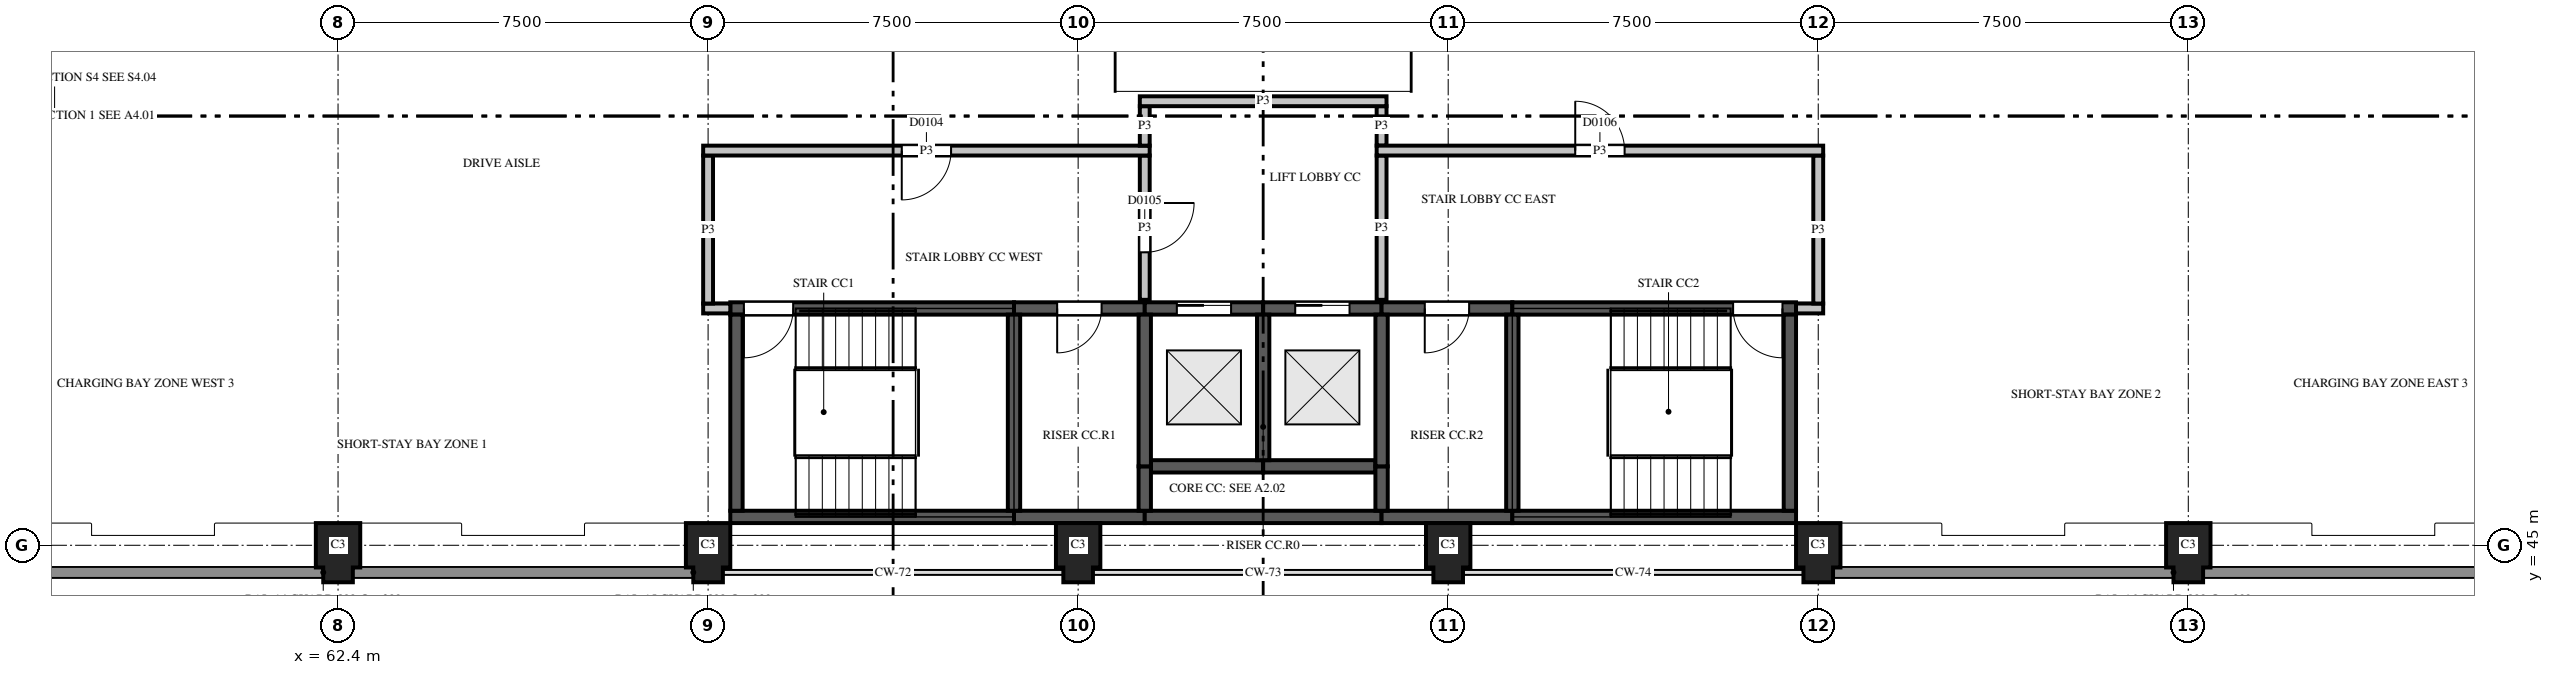
"""IFC4 building model, lengths in metres.
Left out: names, types, materials, properties, quantities, classifications, styles, units other than length and angle.
Written with IfcOpenShell. Run it as: python <this file> out.ifc"""

import sys

from ifc_helpers import new_model, si_unit, direction, frame, frame_2d, origin, place, context, subcontext, project, spatial, polyline, rectangle, outline, extrude, element, fill, save


model = new_model("IFC4")
c1 = context("Model", 3, precision=1e-05, world=origin(), true_north=direction((0.0, 1.0)))
c2 = subcontext(c1, "Body", "Model", "MODEL_VIEW")
j1 = project(units=[si_unit("LENGTHUNIT", "METRE"), si_unit("PLANEANGLEUNIT", "RADIAN")], contexts=[c1])
p1 = place(None, origin())
s1 = spatial("IfcSite", under=j1, at=p1, CompositionType="ELEMENT")
p2 = place(p1, origin())
s2 = spatial("IfcBuilding", under=s1, at=p2, CompositionType="ELEMENT")
p3 = place(p2, frame((0.0, 0.0, 4.5)))
s3 = spatial("IfcBuildingStorey", under=s2, at=p3, CompositionType="ELEMENT", Elevation=4.5)
for number, where, z_axis, x_axis in (
    (1, (62.4, 45.0, 0.0), (0.0, 0.0, 1.0), (0.0, -1.0, 0.0)),
    (2, (69.9, 45.0, 0.0), (0.0, 0.0, 1.0), (0.0, -1.0, 0.0)),
    (3, (77.4, 45.0, 0.0), (0.0, 0.0, 1.0), (0.0, -1.0, 0.0)),
    (4, (84.9, 45.0, 0.0), (0.0, 0.0, 1.0), (0.0, -1.0, 0.0)),
    (5, (92.4, 45.0, 0.0), (0.0, 0.0, 1.0), (0.0, -1.0, 0.0)),
    (6, (99.9, 45.0, 0.0), (0.0, 0.0, 1.0), (0.0, -1.0, 0.0)),
):
    element("IfcColumn", number, at=place(p3, frame(where, z_axis=z_axis, x_axis=x_axis)), inside=s3, PredefinedType="COLUMN", context=c2, shape_type="SweptSolid", body=[
        extrude(outline(polyline([(-0.45, -0.45), (0.45, -0.45), (0.45, -0.3), (0.75, -0.3), (0.75, 0.3), (0.45, 0.3), (0.45, 0.45), (-0.45, 0.45), (-0.45, -0.45)])), origin(), (0.0, 0.0, 1.0), 3.7),
    ])
p4 = place(p3, frame((70.35, 45.575, 0.0), z_axis=(0.0, 0.0, 1.0), x_axis=(1.0, 0.0, 0.0)))
e7 = element("IfcWall", 7, at=p4, inside=s3, PredefinedType="SHEAR", context=c2, shape_type="SweptSolid", body=[
    extrude(rectangle(XDim=5.75, YDim=0.25, at=frame_2d((2.875, 0.0))), origin(), (0.0, 0.0, 1.0), 3.7),
])
p5 = place(p3, frame((76.1, 45.575, 0.0), z_axis=(0.0, 0.0, 1.0), x_axis=(1.0, 0.0, 0.0)))
e8 = element("IfcWall", 8, at=p5, inside=s3, PredefinedType="SHEAR", context=c2, shape_type="SweptSolid", body=[
    extrude(rectangle(XDim=2.65, YDim=0.25, at=frame_2d((1.325, 0.0))), origin(), (0.0, 0.0, 1.0), 3.7),
])
p6 = place(p3, frame((78.75, 45.575, 0.0), z_axis=(0.0, 0.0, 1.0), x_axis=(1.0, 0.0, 0.0)))
e9 = element("IfcWall", 9, at=p6, inside=s3, PredefinedType="SHEAR", context=c2, shape_type="SweptSolid", body=[
    extrude(rectangle(XDim=4.8, YDim=0.25, at=frame_2d((2.4, 0.0))), origin(), (0.0, 0.0, 1.0), 3.7),
])
p7 = place(p3, frame((83.55, 45.575, 0.0), z_axis=(0.0, 0.0, 1.0), x_axis=(1.0, 0.0, 0.0)))
e10 = element("IfcWall", 10, at=p7, inside=s3, PredefinedType="SHEAR", context=c2, shape_type="SweptSolid", body=[
    extrude(rectangle(XDim=2.65, YDim=0.25, at=frame_2d((1.325, 0.0))), origin(), (0.0, 0.0, 1.0), 3.7),
])
p8 = place(p3, frame((86.2, 45.575, 0.0), z_axis=(0.0, 0.0, 1.0), x_axis=(1.0, 0.0, 0.0)))
e11 = element("IfcWall", 11, at=p8, inside=s3, PredefinedType="SHEAR", context=c2, shape_type="SweptSolid", body=[
    extrude(rectangle(XDim=5.75, YDim=0.25, at=frame_2d((2.875, 0.0))), origin(), (0.0, 0.0, 1.0), 3.7),
])
p9 = place(p3, frame((78.875, 46.6, 0.0), z_axis=(0.0, 0.0, 1.0), x_axis=(1.0, 0.0, 0.0)))
e12 = element("IfcWall", 12, at=p9, inside=s3, PredefinedType="SHEAR", context=c2, shape_type="SweptSolid", body=[
    extrude(rectangle(XDim=2.275, YDim=0.25, at=frame_2d((1.137, 0.0))), origin(), (0.0, 0.0, 1.0), 3.7),
])
p10 = place(p3, frame((81.15, 46.6, 0.0), z_axis=(0.0, 0.0, 1.0), x_axis=(1.0, 0.0, 0.0)))
e13 = element("IfcWall", 13, at=p10, inside=s3, PredefinedType="SHEAR", context=c2, shape_type="SweptSolid", body=[
    extrude(rectangle(XDim=2.275, YDim=0.25, at=frame_2d((1.138, 0.0))), origin(), (0.0, 0.0, 1.0), 3.7),
])
p11 = place(p3, frame((70.35, 49.8, 0.0), z_axis=(0.0, 0.0, 1.0), x_axis=(1.0, 0.0, 0.0)))
e14 = element("IfcWall", 14, at=p11, inside=s3, PredefinedType="SHEAR", context=c2, shape_type="SweptSolid", body=[
    extrude(rectangle(XDim=5.75, YDim=0.25, at=frame_2d((2.875, 0.0))), origin(), (0.0, 0.0, 1.0), 3.7),
])
p12 = place(p11, frame((0.275, 0.0, 0.0)))
e15 = element("IfcOpeningElement", 15, at=p12, cuts=e14, PredefinedType="OPENING", context=c2, shape_type="SweptSolid", body=[
    extrude(rectangle(XDim=1.0, YDim=2.1, at=frame_2d((0.5, 1.05))), frame((0.0, 0.135, 0.0), z_axis=(0.0, -1.0, 0.0), x_axis=(1.0, 0.0, 0.0)), (0.0, 0.0, 1.0), 0.27),
])
p13 = place(p3, frame((76.1, 49.8, 0.0), z_axis=(0.0, 0.0, 1.0), x_axis=(1.0, 0.0, 0.0)))
e16 = element("IfcWall", 16, at=p13, inside=s3, PredefinedType="SHEAR", context=c2, shape_type="SweptSolid", body=[
    extrude(rectangle(XDim=2.65, YDim=0.25, at=frame_2d((1.325, 0.0))), origin(), (0.0, 0.0, 1.0), 3.7),
])
p14 = place(p13, frame((0.875, 0.0, 0.0)))
e17 = element("IfcOpeningElement", 17, at=p14, cuts=e16, PredefinedType="OPENING", context=c2, shape_type="SweptSolid", body=[
    extrude(rectangle(XDim=0.9, YDim=2.1, at=frame_2d((0.45, 1.05))), frame((0.0, 0.135, 0.0), z_axis=(0.0, -1.0, 0.0), x_axis=(1.0, 0.0, 0.0)), (0.0, 0.0, 1.0), 0.27),
])
p15 = place(p3, frame((78.75, 49.8, 0.0), z_axis=(0.0, 0.0, 1.0), x_axis=(1.0, 0.0, 0.0)))
e18 = element("IfcWall", 18, at=p15, inside=s3, PredefinedType="SHEAR", context=c2, shape_type="SweptSolid", body=[
    extrude(rectangle(XDim=2.4, YDim=0.25, at=frame_2d((1.2, 0.0))), origin(), (0.0, 0.0, 1.0), 3.7),
])
p16 = place(p15, frame((0.65, 0.0, 0.0)))
e19 = element("IfcOpeningElement", 19, at=p16, cuts=e18, PredefinedType="OPENING", context=c2, shape_type="SweptSolid", body=[
    extrude(rectangle(XDim=1.1, YDim=2.1, at=frame_2d((0.55, 1.05))), frame((0.0, 0.135, 0.0), z_axis=(0.0, -1.0, 0.0), x_axis=(1.0, 0.0, 0.0)), (0.0, 0.0, 1.0), 0.27),
])
p17 = place(p3, frame((81.15, 49.8, 0.0), z_axis=(0.0, 0.0, 1.0), x_axis=(1.0, 0.0, 0.0)))
e20 = element("IfcWall", 20, at=p17, inside=s3, PredefinedType="SHEAR", context=c2, shape_type="SweptSolid", body=[
    extrude(rectangle(XDim=2.4, YDim=0.25, at=frame_2d((1.2, 0.0))), origin(), (0.0, 0.0, 1.0), 3.7),
])
p18 = place(p17, frame((0.65, 0.0, 0.0)))
e21 = element("IfcOpeningElement", 21, at=p18, cuts=e20, PredefinedType="OPENING", context=c2, shape_type="SweptSolid", body=[
    extrude(rectangle(XDim=1.1, YDim=2.1, at=frame_2d((0.55, 1.05))), frame((0.0, 0.135, 0.0), z_axis=(0.0, -1.0, 0.0), x_axis=(1.0, 0.0, 0.0)), (0.0, 0.0, 1.0), 0.27),
])
p19 = place(p3, frame((83.55, 49.8, 0.0), z_axis=(0.0, 0.0, 1.0), x_axis=(1.0, 0.0, 0.0)))
e22 = element("IfcWall", 22, at=p19, inside=s3, PredefinedType="SHEAR", context=c2, shape_type="SweptSolid", body=[
    extrude(rectangle(XDim=2.65, YDim=0.25, at=frame_2d((1.325, 0.0))), origin(), (0.0, 0.0, 1.0), 3.7),
])
p20 = place(p19, frame((0.875, 0.0, 0.0)))
e23 = element("IfcOpeningElement", 23, at=p20, cuts=e22, PredefinedType="OPENING", context=c2, shape_type="SweptSolid", body=[
    extrude(rectangle(XDim=0.9, YDim=2.1, at=frame_2d((0.45, 1.05))), frame((0.0, 0.135, 0.0), z_axis=(0.0, -1.0, 0.0), x_axis=(1.0, 0.0, 0.0)), (0.0, 0.0, 1.0), 0.27),
])
p21 = place(p3, frame((86.2, 49.8, 0.0), z_axis=(0.0, 0.0, 1.0), x_axis=(1.0, 0.0, 0.0)))
e24 = element("IfcWall", 24, at=p21, inside=s3, PredefinedType="SHEAR", context=c2, shape_type="SweptSolid", body=[
    extrude(rectangle(XDim=5.75, YDim=0.25, at=frame_2d((2.875, 0.0))), origin(), (0.0, 0.0, 1.0), 3.7),
])
p22 = place(p21, frame((4.475, 0.0, 0.0)))
e25 = element("IfcOpeningElement", 25, at=p22, cuts=e24, PredefinedType="OPENING", context=c2, shape_type="SweptSolid", body=[
    extrude(rectangle(XDim=1.0, YDim=2.1, at=frame_2d((0.5, 1.05))), frame((0.0, 0.135, 0.0), z_axis=(0.0, -1.0, 0.0), x_axis=(1.0, 0.0, 0.0)), (0.0, 0.0, 1.0), 0.27),
])
for number, where, z_axis, x_axis in (
    (26, (70.475, 45.7, 0.0), (0.0, 0.0, 1.0), (0.0, 1.0, 0.0)),
    (27, (76.1, 45.7, 0.0), (0.0, 0.0, 1.0), (0.0, 1.0, 0.0)),
):
    element("IfcWall", number, at=place(p3, frame(where, z_axis=z_axis, x_axis=x_axis)), inside=s3, PredefinedType="SHEAR", context=c2, shape_type="SweptSolid", body=[
        extrude(rectangle(XDim=3.975, YDim=0.25, at=frame_2d((1.988, 0.0))), origin(), (0.0, 0.0, 1.0), 3.7),
    ])
p23 = place(p3, frame((78.75, 45.7, 0.0), z_axis=(0.0, 0.0, 1.0), x_axis=(0.0, 1.0, 0.0)))
e28 = element("IfcWall", 28, at=p23, inside=s3, PredefinedType="SHEAR", context=c2, shape_type="SweptSolid", body=[
    extrude(rectangle(XDim=0.9, YDim=0.25, at=frame_2d((0.45, 0.0))), origin(), (0.0, 0.0, 1.0), 3.7),
])
p24 = place(p3, frame((78.75, 46.6, 0.0), z_axis=(0.0, 0.0, 1.0), x_axis=(0.0, 1.0, 0.0)))
e29 = element("IfcWall", 29, at=p24, inside=s3, PredefinedType="SHEAR", context=c2, shape_type="SweptSolid", body=[
    extrude(rectangle(XDim=3.075, YDim=0.25, at=frame_2d((1.538, 0.0))), origin(), (0.0, 0.0, 1.0), 3.7),
])
p25 = place(p3, frame((81.15, 46.725, 0.0), z_axis=(0.0, 0.0, 1.0), x_axis=(0.0, 1.0, 0.0)))
e30 = element("IfcWall", 30, at=p25, inside=s3, PredefinedType="SHEAR", context=c2, shape_type="SweptSolid", body=[
    extrude(rectangle(XDim=2.95, YDim=0.25, at=frame_2d((1.475, 0.0))), origin(), (0.0, 0.0, 1.0), 3.7),
])
p26 = place(p3, frame((83.55, 45.7, 0.0), z_axis=(0.0, 0.0, 1.0), x_axis=(0.0, 1.0, 0.0)))
e31 = element("IfcWall", 31, at=p26, inside=s3, PredefinedType="SHEAR", context=c2, shape_type="SweptSolid", body=[
    extrude(rectangle(XDim=0.9, YDim=0.25, at=frame_2d((0.45, 0.0))), origin(), (0.0, 0.0, 1.0), 3.7),
])
p27 = place(p3, frame((83.55, 46.6, 0.0), z_axis=(0.0, 0.0, 1.0), x_axis=(0.0, 1.0, 0.0)))
e32 = element("IfcWall", 32, at=p27, inside=s3, PredefinedType="SHEAR", context=c2, shape_type="SweptSolid", body=[
    extrude(rectangle(XDim=3.075, YDim=0.25, at=frame_2d((1.538, 0.0))), origin(), (0.0, 0.0, 1.0), 3.7),
])
for number, where, z_axis, x_axis in (
    (33, (86.2, 45.7, 0.0), (0.0, 0.0, 1.0), (0.0, 1.0, 0.0)),
    (34, (91.825, 45.7, 0.0), (0.0, 0.0, 1.0), (0.0, 1.0, 0.0)),
):
    element("IfcWall", number, at=place(p3, frame(where, z_axis=z_axis, x_axis=x_axis)), inside=s3, PredefinedType="SHEAR", context=c2, shape_type="SweptSolid", body=[
        extrude(rectangle(XDim=3.975, YDim=0.25, at=frame_2d((1.988, 0.0))), origin(), (0.0, 0.0, 1.0), 3.7),
    ])
for number, where, z_axis, x_axis in (
    (35, (69.8, 49.8, 0.0), (0.0, 0.0, 1.0), (1.0, 0.0, 0.0)),
    (36, (91.95, 49.8, 0.0), (0.0, 0.0, 1.0), (1.0, 0.0, 0.0)),
):
    element("IfcWall", number, at=place(p3, frame(where, z_axis=z_axis, x_axis=x_axis)), inside=s3, PredefinedType="PARTITIONING", context=c2, shape_type="SweptSolid", body=[
        extrude(rectangle(XDim=0.55, YDim=0.2, at=frame_2d((0.275, 0.0))), origin(), (0.0, 0.0, 1.0), 2.88),
    ])
p28 = place(p3, frame((92.4, 49.9, 0.0), z_axis=(0.0, 0.0, 1.0), x_axis=(0.0, 1.0, 0.0)))
e37 = element("IfcWall", 37, at=p28, inside=s3, PredefinedType="PARTITIONING", context=c2, shape_type="SweptSolid", body=[
    extrude(rectangle(XDim=3.0, YDim=0.2, at=frame_2d((1.5, 0.0))), origin(), (0.0, 0.0, 1.0), 2.88),
])
p29 = place(p3, frame((78.75, 49.975, 0.0), z_axis=(0.0, 0.0, 1.0), x_axis=(0.0, 1.0, 0.0)))
e38 = element("IfcWall", 38, at=p29, inside=s3, PredefinedType="PARTITIONING", context=c2, shape_type="SweptSolid", body=[
    extrude(rectangle(XDim=2.925, YDim=0.2, at=frame_2d((1.462, 0.0))), origin(), (0.0, 0.0, 1.0), 2.88),
])
p30 = place(p29, frame((0.962, 0.0, 0.0)))
e39 = element("IfcOpeningElement", 39, at=p30, cuts=e38, PredefinedType="OPENING", context=c2, shape_type="SweptSolid", body=[
    extrude(rectangle(XDim=1.0, YDim=2.1, at=frame_2d((0.5, 1.05))), frame((0.0, 0.11, 0.0), z_axis=(0.0, -1.0, 0.0), x_axis=(1.0, 0.0, 0.0)), (0.0, 0.0, 1.0), 0.22),
])
p31 = place(p3, frame((83.55, 49.975, 0.0), z_axis=(0.0, 0.0, 1.0), x_axis=(0.0, 1.0, 0.0)))
e40 = element("IfcWall", 40, at=p31, inside=s3, PredefinedType="PARTITIONING", context=c2, shape_type="SweptSolid", body=[
    extrude(rectangle(XDim=2.925, YDim=0.2, at=frame_2d((1.462, 0.0))), origin(), (0.0, 0.0, 1.0), 2.88),
])
p32 = place(p3, frame((69.9, 52.9, 0.0), z_axis=(0.0, 0.0, 1.0), x_axis=(0.0, -1.0, 0.0)))
e41 = element("IfcWall", 41, at=p32, inside=s3, PredefinedType="PARTITIONING", context=c2, shape_type="SweptSolid", body=[
    extrude(rectangle(XDim=3.0, YDim=0.2, at=frame_2d((1.5, 0.0))), origin(), (0.0, 0.0, 1.0), 2.88),
])
p33 = place(p3, frame((78.85, 53.0, 0.0), z_axis=(0.0, 0.0, 1.0), x_axis=(-1.0, 0.0, 0.0)))
e42 = element("IfcWall", 42, at=p33, inside=s3, PredefinedType="PARTITIONING", context=c2, shape_type="SweptSolid", body=[
    extrude(rectangle(XDim=9.05, YDim=0.2, at=frame_2d((4.525, 0.0))), origin(), (0.0, 0.0, 1.0), 2.88),
])
p34 = place(p33, frame((4.025, 0.0, 0.0)))
e43 = element("IfcOpeningElement", 43, at=p34, cuts=e42, PredefinedType="OPENING", context=c2, shape_type="SweptSolid", body=[
    extrude(rectangle(XDim=1.0, YDim=2.1, at=frame_2d((0.5, 1.05))), frame((0.0, 0.11, 0.0), z_axis=(0.0, -1.0, 0.0), x_axis=(1.0, 0.0, 0.0)), (0.0, 0.0, 1.0), 0.22),
])
p35 = place(p3, frame((83.55, 53.1, 0.0), z_axis=(0.0, 0.0, 1.0), x_axis=(0.0, 1.0, 0.0)))
e44 = element("IfcWall", 44, at=p35, inside=s3, PredefinedType="PARTITIONING", context=c2, shape_type="SweptSolid", body=[
    extrude(rectangle(XDim=0.8, YDim=0.2, at=frame_2d((0.4, 0.0))), origin(), (0.0, 0.0, 1.0), 2.88),
])
p36 = place(p3, frame((92.5, 53.0, 0.0), z_axis=(0.0, 0.0, 1.0), x_axis=(-1.0, 0.0, 0.0)))
e45 = element("IfcWall", 45, at=p36, inside=s3, PredefinedType="PARTITIONING", context=c2, shape_type="SweptSolid", body=[
    extrude(rectangle(XDim=9.05, YDim=0.2, at=frame_2d((4.525, 0.0))), origin(), (0.0, 0.0, 1.0), 2.88),
])
p37 = place(p36, frame((4.025, 0.0, 0.0)))
e46 = element("IfcOpeningElement", 46, at=p37, cuts=e45, PredefinedType="OPENING", context=c2, shape_type="SweptSolid", body=[
    extrude(rectangle(XDim=1.0, YDim=2.1, at=frame_2d((0.5, 1.05))), frame((0.0, 0.11, 0.0), z_axis=(0.0, -1.0, 0.0), x_axis=(1.0, 0.0, 0.0)), (0.0, 0.0, 1.0), 0.22),
])
p38 = place(p3, frame((78.75, 53.9, 0.0), z_axis=(0.0, 0.0, 1.0), x_axis=(0.0, -1.0, 0.0)))
e47 = element("IfcWall", 47, at=p38, inside=s3, PredefinedType="PARTITIONING", context=c2, shape_type="SweptSolid", body=[
    extrude(rectangle(XDim=0.8, YDim=0.2, at=frame_2d((0.4, 0.0))), origin(), (0.0, 0.0, 1.0), 2.88),
])
p39 = place(p3, frame((83.65, 54.0, 0.0), z_axis=(0.0, 0.0, 1.0), x_axis=(-1.0, 0.0, 0.0)))
e48 = element("IfcWall", 48, at=p39, inside=s3, PredefinedType="PARTITIONING", context=c2, shape_type="SweptSolid", body=[
    extrude(rectangle(XDim=5.0, YDim=0.2, at=frame_2d((2.5, 0.0))), origin(), (0.0, 0.0, 1.0), 2.88),
])
p40 = place(p34, origin())
e49 = element("IfcDoor", 49, at=p40, inside=s3, OperationType="SINGLE_SWING_LEFT", PredefinedType="DOOR", context=c2, shape_type="SweptSolid", body=[
    extrude(rectangle(XDim=1.0, YDim=2.1, at=frame_2d((0.5, 1.05))), frame((0.0, 0.025, 0.0), z_axis=(0.0, -1.0, 0.0), x_axis=(1.0, 0.0, 0.0)), (0.0, 0.0, 1.0), 0.05),
])
fill(e43, e49)
p41 = place(p30, origin())
e50 = element("IfcDoor", 50, at=p41, inside=s3, OperationType="SINGLE_SWING_RIGHT", PredefinedType="DOOR", context=c2, shape_type="SweptSolid", body=[
    extrude(rectangle(XDim=1.0, YDim=2.1, at=frame_2d((0.5, 1.05))), frame((0.0, 0.025, 0.0), z_axis=(0.0, -1.0, 0.0), x_axis=(1.0, 0.0, 0.0)), (0.0, 0.0, 1.0), 0.05),
])
fill(e39, e50)
p42 = place(p37, origin())
e51 = element("IfcDoor", 51, at=p42, inside=s3, OperationType="SINGLE_SWING_RIGHT", PredefinedType="DOOR", context=c2, shape_type="SweptSolid", body=[
    extrude(rectangle(XDim=1.0, YDim=2.1, at=frame_2d((0.5, 1.05))), frame((0.0, 0.025, 0.0), z_axis=(0.0, -1.0, 0.0), x_axis=(1.0, 0.0, 0.0)), (0.0, 0.0, 1.0), 0.05),
])
fill(e46, e51)
p43 = place(p16, origin())
e52 = element("IfcDoor", 52, at=p43, inside=s3, OperationType="SLIDING_TO_LEFT", PredefinedType="DOOR", context=c2, shape_type="SweptSolid", body=[
    extrude(rectangle(XDim=1.1, YDim=2.1, at=frame_2d((0.55, 1.05))), frame((0.0, 0.025, 0.0), z_axis=(0.0, -1.0, 0.0), x_axis=(1.0, 0.0, 0.0)), (0.0, 0.0, 1.0), 0.05),
])
fill(e19, e52)
p44 = place(p18, origin())
e53 = element("IfcDoor", 53, at=p44, inside=s3, OperationType="SLIDING_TO_LEFT", PredefinedType="DOOR", context=c2, shape_type="SweptSolid", body=[
    extrude(rectangle(XDim=1.1, YDim=2.1, at=frame_2d((0.55, 1.05))), frame((0.0, 0.025, 0.0), z_axis=(0.0, -1.0, 0.0), x_axis=(1.0, 0.0, 0.0)), (0.0, 0.0, 1.0), 0.05),
])
fill(e21, e53)
p45 = place(p12, origin())
e54 = element("IfcDoor", 54, at=p45, inside=s3, OperationType="SINGLE_SWING_LEFT", PredefinedType="DOOR", context=c2, shape_type="SweptSolid", body=[
    extrude(rectangle(XDim=1.0, YDim=2.1, at=frame_2d((0.5, 1.05))), frame((0.0, 0.025, 0.0), z_axis=(0.0, -1.0, 0.0), x_axis=(1.0, 0.0, 0.0)), (0.0, 0.0, 1.0), 0.05),
])
fill(e15, e54)
p46 = place(p22, origin())
e55 = element("IfcDoor", 55, at=p46, inside=s3, OperationType="SINGLE_SWING_RIGHT", PredefinedType="DOOR", context=c2, shape_type="SweptSolid", body=[
    extrude(rectangle(XDim=1.0, YDim=2.1, at=frame_2d((0.5, 1.05))), frame((0.0, 0.025, 0.0), z_axis=(0.0, -1.0, 0.0), x_axis=(1.0, 0.0, 0.0)), (0.0, 0.0, 1.0), 0.05),
])
fill(e25, e55)
p47 = place(p14, origin())
e56 = element("IfcDoor", 56, at=p47, inside=s3, OperationType="SINGLE_SWING_LEFT", PredefinedType="DOOR", context=c2, shape_type="SweptSolid", body=[
    extrude(rectangle(XDim=0.9, YDim=2.1, at=frame_2d((0.45, 1.05))), frame((0.0, 0.025, 0.0), z_axis=(0.0, -1.0, 0.0), x_axis=(1.0, 0.0, 0.0)), (0.0, 0.0, 1.0), 0.05),
])
fill(e17, e56)
p48 = place(p20, origin())
e57 = element("IfcDoor", 57, at=p48, inside=s3, OperationType="SINGLE_SWING_LEFT", PredefinedType="DOOR", context=c2, shape_type="SweptSolid", body=[
    extrude(rectangle(XDim=0.9, YDim=2.1, at=frame_2d((0.45, 1.05))), frame((0.0, 0.025, 0.0), z_axis=(0.0, -1.0, 0.0), x_axis=(1.0, 0.0, 0.0)), (0.0, 0.0, 1.0), 0.05),
])
fill(e23, e57)
save(model, sys.argv[1])
